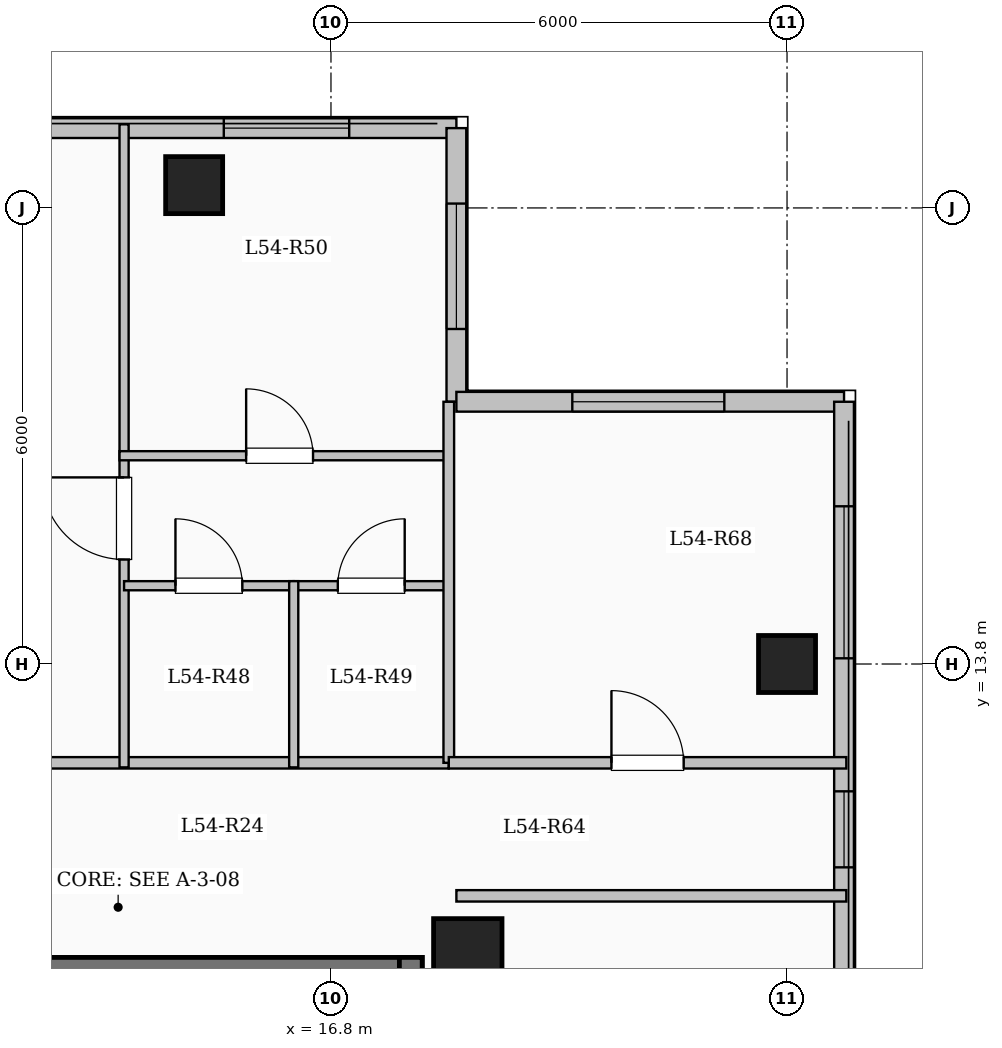
"""IFC4 building model, lengths in metres.
Left out: names, types, materials, properties, quantities, classifications, styles, units other than length and angle.
Written with IfcOpenShell. Run it as: python <this file> out.ifc"""

import sys

from ifc_helpers import new_model, si_unit, direction, frame, frame_2d, origin, origin_2d, place, context, subcontext, project, spatial, rectangle, extrude, element, fill, save


model = new_model("IFC4")
c1 = context("Model", 3, precision=1e-05, world=origin(), true_north=direction((0.0, 1.0)))
c2 = subcontext(c1, "Body", "Model", "MODEL_VIEW")
j1 = project(units=[si_unit("LENGTHUNIT", "METRE"), si_unit("PLANEANGLEUNIT", "RADIAN")], contexts=[c1])
p1 = place(None, origin())
s1 = spatial("IfcSite", under=j1, at=p1, CompositionType="ELEMENT")
p2 = place(p1, origin())
s2 = spatial("IfcBuilding", under=s1, at=p2, CompositionType="ELEMENT")
p3 = place(p2, frame((0.0, 0.0, 200.3)))
s3 = spatial("IfcBuildingStorey", under=s2, at=p3, CompositionType="ELEMENT", Elevation=200.3)
p4 = place(p3, frame((18.6, 10.0, 0.0), z_axis=(0.0, 0.0, 1.0), x_axis=(1.0, 0.0, 0.0)))
e1 = element("IfcColumn", 1, at=p4, inside=s3, PredefinedType="COLUMN", context=c2, shape_type="SweptSolid", body=[
    extrude(rectangle(XDim=0.9, YDim=0.9, at=origin_2d()), origin(), (0.0, 0.0, 1.0), 3.35),
])
for number, where, z_axis, x_axis in (
    (2, (15.0, 20.1, 0.0), (0.0, 0.0, 1.0), (1.0, 0.0, 0.0)),
    (3, (22.8, 13.8, 0.0), (0.0, 0.0, 1.0), (1.0, 0.0, 0.0)),
):
    element("IfcColumn", number, at=place(p3, frame(where, z_axis=z_axis, x_axis=x_axis)), inside=s3, PredefinedType="COLUMN", context=c2, shape_type="SweptSolid", body=[
        extrude(rectangle(XDim=0.75, YDim=0.75, at=origin_2d()), origin(), (0.0, 0.0, 1.0), 3.35),
    ])
p5 = place(p3, frame((7.35, 20.85, 0.0), z_axis=(0.0, 0.0, 1.0), x_axis=(1.0, 0.0, 0.0)))
e4 = element("IfcWall", 4, at=p5, inside=s3, PredefinedType="SOLIDWALL", context=c2, shape_type="SweptSolid", body=[
    extrude(rectangle(XDim=11.1, YDim=0.26, at=frame_2d((5.55, 0.0))), origin(), (0.0, 0.0, 1.0), 3.1),
])
p6 = place(p5, frame((0.555, 0.0, 0.95)))
e5 = element("IfcOpeningElement", 5, at=p6, cuts=e4, PredefinedType="OPENING", context=c2, shape_type="SweptSolid", body=[
    extrude(rectangle(XDim=1.2, YDim=1.5, at=frame_2d((0.6, 0.75))), frame((0.0, 0.14, 0.0), z_axis=(0.0, -1.0, 0.0), x_axis=(1.0, 0.0, 0.0)), (0.0, 0.0, 1.0), 0.28),
])
p7 = place(p5, frame((3.471, 0.0, 0.9)))
e6 = element("IfcOpeningElement", 6, at=p7, cuts=e4, PredefinedType="OPENING", context=c2, shape_type="SweptSolid", body=[
    extrude(rectangle(XDim=2.2, YDim=1.75, at=frame_2d((1.1, 0.875))), frame((0.0, 0.14, 0.0), z_axis=(0.0, -1.0, 0.0), x_axis=(1.0, 0.0, 0.0)), (0.0, 0.0, 1.0), 0.28),
])
p8 = place(p5, frame((8.04, 0.0, 0.9)))
e7 = element("IfcOpeningElement", 7, at=p8, cuts=e4, PredefinedType="OPENING", context=c2, shape_type="SweptSolid", body=[
    extrude(rectangle(XDim=1.65, YDim=1.6, at=frame_2d((0.825, 0.8))), frame((0.0, 0.14, 0.0), z_axis=(0.0, -1.0, 0.0), x_axis=(1.0, 0.0, 0.0)), (0.0, 0.0, 1.0), 0.28),
])
p9 = place(p3, frame((18.45, 20.85, 0.0), z_axis=(0.0, 0.0, 1.0), x_axis=(0.0, -1.0, 0.0)))
e8 = element("IfcWall", 8, at=p9, inside=s3, PredefinedType="SOLIDWALL", context=c2, shape_type="SweptSolid", body=[
    extrude(rectangle(XDim=3.6, YDim=0.26, at=frame_2d((1.8, 0.0))), origin(), (0.0, 0.0, 1.0), 3.1),
])
p10 = place(p9, frame((0.992, 0.0, 0.9)))
e9 = element("IfcOpeningElement", 9, at=p10, cuts=e8, PredefinedType="OPENING", context=c2, shape_type="SweptSolid", body=[
    extrude(rectangle(XDim=1.65, YDim=1.6, at=frame_2d((0.825, 0.8))), frame((0.0, 0.14, 0.0), z_axis=(0.0, -1.0, 0.0), x_axis=(1.0, 0.0, 0.0)), (0.0, 0.0, 1.0), 0.28),
])
p11 = place(p3, frame((18.45, 17.25, 0.0), z_axis=(0.0, 0.0, 1.0), x_axis=(1.0, 0.0, 0.0)))
e10 = element("IfcWall", 10, at=p11, inside=s3, PredefinedType="SOLIDWALL", context=c2, shape_type="SweptSolid", body=[
    extrude(rectangle(XDim=5.1, YDim=0.26, at=frame_2d((2.55, 0.0))), origin(), (0.0, 0.0, 1.0), 3.1),
])
p12 = place(p11, frame((1.525, 0.0, 0.9)))
e11 = element("IfcOpeningElement", 11, at=p12, cuts=e10, PredefinedType="OPENING", context=c2, shape_type="SweptSolid", body=[
    extrude(rectangle(XDim=2.0, YDim=1.7, at=frame_2d((1.0, 0.85))), frame((0.0, 0.14, 0.0), z_axis=(0.0, -1.0, 0.0), x_axis=(1.0, 0.0, 0.0)), (0.0, 0.0, 1.0), 0.28),
])
p13 = place(p3, frame((23.55, 17.25, 0.0), z_axis=(0.0, 0.0, 1.0), x_axis=(0.0, -1.0, 0.0)))
e12 = element("IfcWall", 12, at=p13, inside=s3, PredefinedType="SOLIDWALL", context=c2, shape_type="SweptSolid", body=[
    extrude(rectangle(XDim=34.5, YDim=0.26, at=frame_2d((17.25, 0.0))), origin(), (0.0, 0.0, 1.0), 3.1),
])
p14 = place(p13, frame((1.375, 0.0, 0.9)))
e13 = element("IfcOpeningElement", 13, at=p14, cuts=e12, PredefinedType="OPENING", context=c2, shape_type="SweptSolid", body=[
    extrude(rectangle(XDim=2.0, YDim=1.7, at=frame_2d((1.0, 0.85))), frame((0.0, 0.14, 0.0), z_axis=(0.0, -1.0, 0.0), x_axis=(1.0, 0.0, 0.0)), (0.0, 0.0, 1.0), 0.28),
])
p15 = place(p13, frame((5.125, 0.0, 0.95)))
e14 = element("IfcOpeningElement", 14, at=p15, cuts=e12, PredefinedType="OPENING", context=c2, shape_type="SweptSolid", body=[
    extrude(rectangle(XDim=1.0, YDim=1.5, at=frame_2d((0.5, 0.75))), frame((0.0, 0.14, 0.0), z_axis=(0.0, -1.0, 0.0), x_axis=(1.0, 0.0, 0.0)), (0.0, 0.0, 1.0), 0.28),
])
p16 = place(p13, frame((8.375, 0.0, 0.9)))
e15 = element("IfcOpeningElement", 15, at=p16, cuts=e12, PredefinedType="OPENING", context=c2, shape_type="SweptSolid", body=[
    extrude(rectangle(XDim=2.0, YDim=1.7, at=frame_2d((1.0, 0.85))), frame((0.0, 0.14, 0.0), z_axis=(0.0, -1.0, 0.0), x_axis=(1.0, 0.0, 0.0)), (0.0, 0.0, 1.0), 0.28),
])
p17 = place(p13, frame((13.2, 0.0, 0.9)))
e16 = element("IfcOpeningElement", 16, at=p17, cuts=e12, PredefinedType="OPENING", context=c2, shape_type="SweptSolid", body=[
    extrude(rectangle(XDim=1.65, YDim=1.6, at=frame_2d((0.825, 0.8))), frame((0.0, 0.14, 0.0), z_axis=(0.0, -1.0, 0.0), x_axis=(1.0, 0.0, 0.0)), (0.0, 0.0, 1.0), 0.28),
])
p18 = place(p13, frame((19.05, 0.0, 0.9)))
e17 = element("IfcOpeningElement", 17, at=p18, cuts=e12, PredefinedType="OPENING", context=c2, shape_type="SweptSolid", body=[
    extrude(rectangle(XDim=2.2, YDim=1.75, at=frame_2d((1.1, 0.875))), frame((0.0, 0.14, 0.0), z_axis=(0.0, -1.0, 0.0), x_axis=(1.0, 0.0, 0.0)), (0.0, 0.0, 1.0), 0.28),
])
p19 = place(p13, frame((24.975, 0.0, 0.95)))
e18 = element("IfcOpeningElement", 18, at=p19, cuts=e12, PredefinedType="OPENING", context=c2, shape_type="SweptSolid", body=[
    extrude(rectangle(XDim=1.2, YDim=1.5, at=frame_2d((0.6, 0.75))), frame((0.0, 0.14, 0.0), z_axis=(0.0, -1.0, 0.0), x_axis=(1.0, 0.0, 0.0)), (0.0, 0.0, 1.0), 0.28),
])
p20 = place(p13, frame((29.475, 0.0, 0.9)))
e19 = element("IfcOpeningElement", 19, at=p20, cuts=e12, PredefinedType="OPENING", context=c2, shape_type="SweptSolid", body=[
    extrude(rectangle(XDim=2.2, YDim=1.75, at=frame_2d((1.1, 0.875))), frame((0.0, 0.14, 0.0), z_axis=(0.0, -1.0, 0.0), x_axis=(1.0, 0.0, 0.0)), (0.0, 0.0, 1.0), 0.28),
])
p21 = place(p3, frame((10.0, 9.79, 0.0), z_axis=(0.0, 0.0, 1.0), x_axis=(1.0, 0.0, 0.0)))
e20 = element("IfcWall", 20, at=p21, inside=s3, PredefinedType="SHEAR", context=c2, shape_type="SweptSolid", body=[
    extrude(rectangle(XDim=8.0, YDim=0.3, at=frame_2d((4.0, 0.0))), origin(), (0.0, 0.0, 1.0), 3.35),
])
p22 = place(p3, frame((17.85, 6.35, 0.0), z_axis=(0.0, 0.0, 1.0), x_axis=(0.0, 1.0, 0.0)))
e21 = element("IfcWall", 21, at=p22, inside=s3, PredefinedType="SHEAR", context=c2, shape_type="SweptSolid", body=[
    extrude(rectangle(XDim=3.59, YDim=0.3, at=frame_2d((1.795, 0.0))), origin(), (0.0, 0.0, 1.0), 3.35),
])
p23 = place(p3, frame((3.85, 12.5, 0.0), z_axis=(0.0, 0.0, 1.0), x_axis=(1.0, 0.0, 0.0)))
e22 = element("IfcWall", 22, at=p23, inside=s3, PredefinedType="PARTITIONING", context=c2, shape_type="SweptSolid", body=[
    extrude(rectangle(XDim=14.5, YDim=0.15, at=frame_2d((7.25, 0.0))), origin(), (0.0, 0.0, 1.0), 3.1),
])
p24 = place(p23, frame((0.7, 0.0, 0.0)))
e23 = element("IfcOpeningElement", 23, at=p24, cuts=e22, PredefinedType="OPENING", context=c2, shape_type="SweptSolid", body=[
    extrude(rectangle(XDim=0.96, YDim=2.15, at=frame_2d((0.48, 1.075))), frame((0.0, 0.085, 0.0), z_axis=(0.0, -1.0, 0.0), x_axis=(1.0, 0.0, 0.0)), (0.0, 0.0, 1.0), 0.17),
])
p25 = place(p23, frame((6.656, 0.0, 0.0)))
e24 = element("IfcOpeningElement", 24, at=p25, cuts=e22, PredefinedType="OPENING", context=c2, shape_type="SweptSolid", body=[
    extrude(rectangle(XDim=0.96, YDim=2.15, at=frame_2d((0.48, 1.075))), frame((0.0, 0.085, 0.0), z_axis=(0.0, -1.0, 0.0), x_axis=(1.0, 0.0, 0.0)), (0.0, 0.0, 1.0), 0.17),
])
p26 = place(p3, frame((14.078, 12.44, 0.0), z_axis=(0.0, 0.0, 1.0), x_axis=(0.0, 1.0, 0.0)))
e25 = element("IfcWall", 25, at=p26, inside=s3, PredefinedType="PARTITIONING", context=c2, shape_type="SweptSolid", body=[
    extrude(rectangle(XDim=8.46, YDim=0.12, at=frame_2d((4.23, 0.0))), origin(), (0.0, 0.0, 1.0), 3.1),
])
p27 = place(p26, frame((2.735, 0.0, 0.0)))
e26 = element("IfcOpeningElement", 26, at=p27, cuts=e25, PredefinedType="OPENING", context=c2, shape_type="SweptSolid", body=[
    extrude(rectangle(XDim=1.08, YDim=2.15, at=frame_2d((0.54, 1.075))), frame((0.0, 0.07, 0.0), z_axis=(0.0, -1.0, 0.0), x_axis=(1.0, 0.0, 0.0)), (0.0, 0.0, 1.0), 0.14),
])
p28 = place(p3, frame((14.078, 14.83, 0.0), z_axis=(0.0, 0.0, 1.0), x_axis=(1.0, 0.0, 0.0)))
e27 = element("IfcWall", 27, at=p28, inside=s3, PredefinedType="PARTITIONING", context=c2, shape_type="SweptSolid", body=[
    extrude(rectangle(XDim=2.232, YDim=0.12, at=frame_2d((1.116, 0.0))), origin(), (0.0, 0.0, 1.0), 3.1),
])
p29 = place(p28, frame((0.676, 0.0, 0.0)))
e28 = element("IfcOpeningElement", 28, at=p29, cuts=e27, PredefinedType="OPENING", context=c2, shape_type="SweptSolid", body=[
    extrude(rectangle(XDim=0.88, YDim=2.1, at=frame_2d((0.44, 1.05))), frame((0.0, 0.07, 0.0), z_axis=(0.0, -1.0, 0.0), x_axis=(1.0, 0.0, 0.0)), (0.0, 0.0, 1.0), 0.14),
])
p30 = place(p3, frame((16.31, 14.83, 0.0), z_axis=(0.0, 0.0, 1.0), x_axis=(1.0, 0.0, 0.0)))
e29 = element("IfcWall", 29, at=p30, inside=s3, PredefinedType="PARTITIONING", context=c2, shape_type="SweptSolid", body=[
    extrude(rectangle(XDim=2.04, YDim=0.12, at=frame_2d((1.02, 0.0))), origin(), (0.0, 0.0, 1.0), 3.1),
])
p31 = place(p30, frame((0.58, 0.0, 0.0)))
e30 = element("IfcOpeningElement", 30, at=p31, cuts=e29, PredefinedType="OPENING", context=c2, shape_type="SweptSolid", body=[
    extrude(rectangle(XDim=0.88, YDim=2.1, at=frame_2d((0.44, 1.05))), frame((0.0, 0.07, 0.0), z_axis=(0.0, -1.0, 0.0), x_axis=(1.0, 0.0, 0.0)), (0.0, 0.0, 1.0), 0.14),
])
p32 = place(p3, frame((14.018, 16.54, 0.0), z_axis=(0.0, 0.0, 1.0), x_axis=(1.0, 0.0, 0.0)))
e31 = element("IfcWall", 31, at=p32, inside=s3, PredefinedType="PARTITIONING", context=c2, shape_type="SweptSolid", body=[
    extrude(rectangle(XDim=4.392, YDim=0.12, at=frame_2d((2.196, 0.0))), origin(), (0.0, 0.0, 1.0), 3.1),
])
p33 = place(p32, frame((1.666, 0.0, 0.0)))
e32 = element("IfcOpeningElement", 32, at=p33, cuts=e31, PredefinedType="OPENING", context=c2, shape_type="SweptSolid", body=[
    extrude(rectangle(XDim=0.88, YDim=2.1, at=frame_2d((0.44, 1.05))), frame((0.0, 0.07, 0.0), z_axis=(0.0, -1.0, 0.0), x_axis=(1.0, 0.0, 0.0)), (0.0, 0.0, 1.0), 0.14),
])
p34 = place(p3, frame((16.31, 12.44, 0.0), z_axis=(0.0, 0.0, 1.0), x_axis=(0.0, 1.0, 0.0)))
e33 = element("IfcWall", 33, at=p34, inside=s3, PredefinedType="PARTITIONING", context=c2, shape_type="SweptSolid", body=[
    extrude(rectangle(XDim=2.45, YDim=0.12, at=frame_2d((1.225, 0.0))), origin(), (0.0, 0.0, 1.0), 3.1),
])
p35 = place(p3, frame((18.45, 10.75, 0.0), z_axis=(0.0, 0.0, 1.0), x_axis=(1.0, 0.0, 0.0)))
e34 = element("IfcWall", 34, at=p35, inside=s3, PredefinedType="PARTITIONING", context=c2, shape_type="SweptSolid", body=[
    extrude(rectangle(XDim=5.13, YDim=0.15, at=frame_2d((2.565, 0.0))), origin(), (0.0, 0.0, 1.0), 3.1),
])
p36 = place(p3, frame((18.35, 12.5, 0.0), z_axis=(0.0, 0.0, 1.0), x_axis=(0.0, 1.0, 0.0)))
e35 = element("IfcWall", 35, at=p36, inside=s3, PredefinedType="PARTITIONING", context=c2, shape_type="SweptSolid", body=[
    extrude(rectangle(XDim=4.75, YDim=0.14, at=frame_2d((2.375, 0.0))), origin(), (0.0, 0.0, 1.0), 3.1),
])
p37 = place(p3, frame((18.35, 12.5, 0.0), z_axis=(0.0, 0.0, 1.0), x_axis=(1.0, 0.0, 0.0)))
e36 = element("IfcWall", 36, at=p37, inside=s3, PredefinedType="PARTITIONING", context=c2, shape_type="SweptSolid", body=[
    extrude(rectangle(XDim=5.23, YDim=0.15, at=frame_2d((2.615, 0.0))), origin(), (0.0, 0.0, 1.0), 3.1),
])
p38 = place(p37, frame((2.14, 0.0, 0.0)))
e37 = element("IfcOpeningElement", 37, at=p38, cuts=e36, PredefinedType="OPENING", context=c2, shape_type="SweptSolid", body=[
    extrude(rectangle(XDim=0.95, YDim=2.15, at=frame_2d((0.475, 1.075))), frame((0.0, 0.085, 0.0), z_axis=(0.0, -1.0, 0.0), x_axis=(1.0, 0.0, 0.0)), (0.0, 0.0, 1.0), 0.17),
])
p39 = place(p8, origin())
e38 = element("IfcWindow", 38, at=p39, inside=s3, PartitioningType="SINGLE_PANEL", PredefinedType="WINDOW", context=c2, shape_type="SweptSolid", body=[
    extrude(rectangle(XDim=1.65, YDim=1.6, at=frame_2d((0.825, 0.8))), frame((0.0, 0.03, 0.0), z_axis=(0.0, -1.0, 0.0), x_axis=(1.0, 0.0, 0.0)), (0.0, 0.0, 1.0), 0.06),
])
fill(e7, e38)
p40 = place(p10, origin())
e39 = element("IfcWindow", 39, at=p40, inside=s3, PartitioningType="SINGLE_PANEL", PredefinedType="WINDOW", context=c2, shape_type="SweptSolid", body=[
    extrude(rectangle(XDim=1.65, YDim=1.6, at=frame_2d((0.825, 0.8))), frame((0.0, 0.03, 0.0), z_axis=(0.0, -1.0, 0.0), x_axis=(1.0, 0.0, 0.0)), (0.0, 0.0, 1.0), 0.06),
])
fill(e9, e39)
p41 = place(p12, origin())
e40 = element("IfcWindow", 40, at=p41, inside=s3, PartitioningType="SINGLE_PANEL", PredefinedType="WINDOW", context=c2, shape_type="SweptSolid", body=[
    extrude(rectangle(XDim=2.0, YDim=1.7, at=frame_2d((1.0, 0.85))), frame((0.0, 0.03, 0.0), z_axis=(0.0, -1.0, 0.0), x_axis=(1.0, 0.0, 0.0)), (0.0, 0.0, 1.0), 0.06),
])
fill(e11, e40)
p42 = place(p14, origin())
e41 = element("IfcWindow", 41, at=p42, inside=s3, PartitioningType="SINGLE_PANEL", PredefinedType="WINDOW", context=c2, shape_type="SweptSolid", body=[
    extrude(rectangle(XDim=2.0, YDim=1.7, at=frame_2d((1.0, 0.85))), frame((0.0, 0.03, 0.0), z_axis=(0.0, -1.0, 0.0), x_axis=(1.0, 0.0, 0.0)), (0.0, 0.0, 1.0), 0.06),
])
fill(e13, e41)
p43 = place(p15, origin())
e42 = element("IfcWindow", 42, at=p43, inside=s3, PartitioningType="SINGLE_PANEL", PredefinedType="WINDOW", context=c2, shape_type="SweptSolid", body=[
    extrude(rectangle(XDim=1.0, YDim=1.5, at=frame_2d((0.5, 0.75))), frame((0.0, 0.03, 0.0), z_axis=(0.0, -1.0, 0.0), x_axis=(1.0, 0.0, 0.0)), (0.0, 0.0, 1.0), 0.06),
])
fill(e14, e42)
p44 = place(p27, origin())
e43 = element("IfcDoor", 43, at=p44, inside=s3, OperationType="SINGLE_SWING_RIGHT", PredefinedType="DOOR", context=c2, shape_type="SweptSolid", body=[
    extrude(rectangle(XDim=1.08, YDim=2.15, at=frame_2d((0.54, 1.075))), frame((0.0, 0.025, 0.0), z_axis=(0.0, -1.0, 0.0), x_axis=(1.0, 0.0, 0.0)), (0.0, 0.0, 1.0), 0.05),
])
fill(e26, e43)
p45 = place(p29, origin())
e44 = element("IfcDoor", 44, at=p45, inside=s3, OperationType="SINGLE_SWING_LEFT", PredefinedType="DOOR", context=c2, shape_type="SweptSolid", body=[
    extrude(rectangle(XDim=0.88, YDim=2.1, at=frame_2d((0.44, 1.05))), frame((0.0, 0.025, 0.0), z_axis=(0.0, -1.0, 0.0), x_axis=(1.0, 0.0, 0.0)), (0.0, 0.0, 1.0), 0.05),
])
fill(e28, e44)
p46 = place(p31, origin())
e45 = element("IfcDoor", 45, at=p46, inside=s3, OperationType="SINGLE_SWING_RIGHT", PredefinedType="DOOR", context=c2, shape_type="SweptSolid", body=[
    extrude(rectangle(XDim=0.88, YDim=2.1, at=frame_2d((0.44, 1.05))), frame((0.0, 0.025, 0.0), z_axis=(0.0, -1.0, 0.0), x_axis=(1.0, 0.0, 0.0)), (0.0, 0.0, 1.0), 0.05),
])
fill(e30, e45)
p47 = place(p33, origin())
e46 = element("IfcDoor", 46, at=p47, inside=s3, OperationType="SINGLE_SWING_LEFT", PredefinedType="DOOR", context=c2, shape_type="SweptSolid", body=[
    extrude(rectangle(XDim=0.88, YDim=2.1, at=frame_2d((0.44, 1.05))), frame((0.0, 0.025, 0.0), z_axis=(0.0, -1.0, 0.0), x_axis=(1.0, 0.0, 0.0)), (0.0, 0.0, 1.0), 0.05),
])
fill(e32, e46)
p48 = place(p38, origin())
e47 = element("IfcDoor", 47, at=p48, inside=s3, OperationType="SINGLE_SWING_LEFT", PredefinedType="DOOR", context=c2, shape_type="SweptSolid", body=[
    extrude(rectangle(XDim=0.95, YDim=2.15, at=frame_2d((0.475, 1.075))), frame((0.0, 0.025, 0.0), z_axis=(0.0, -1.0, 0.0), x_axis=(1.0, 0.0, 0.0)), (0.0, 0.0, 1.0), 0.05),
])
fill(e37, e47)
save(model, sys.argv[1])
